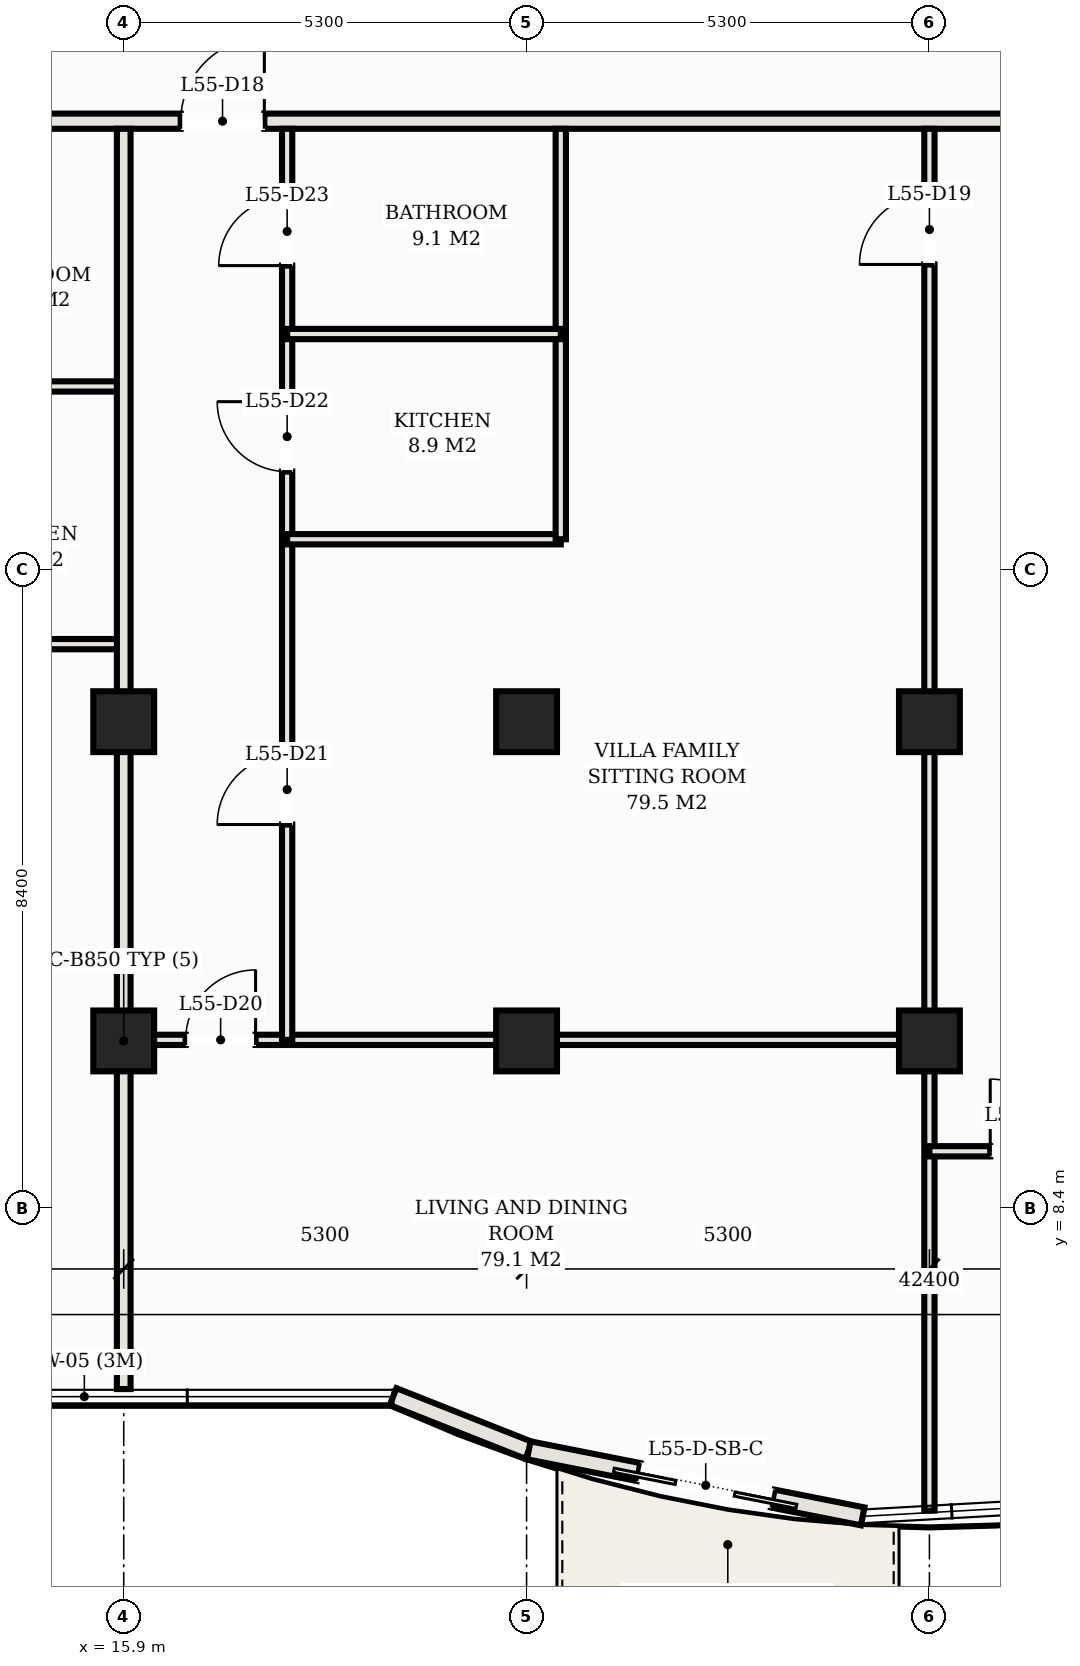
"""IFC4 building model, lengths in metres.
Left out: names, types, materials, properties, quantities, classifications, styles, units other than length and angle.
Written with IfcOpenShell. Run it as: python <this file> out.ifc"""

import sys

from ifc_helpers import new_model, si_unit, direction, frame, frame_2d, origin, origin_2d, place, context, subcontext, project, spatial, rectangle, hollow_rectangle, extrude, element, fill, save


model = new_model("IFC4")
c1 = context("Model", 3, precision=1e-05, world=origin(), true_north=direction((0.0, 1.0)))
c2 = subcontext(c1, "Body", "Model", "MODEL_VIEW")
j1 = project(units=[si_unit("LENGTHUNIT", "METRE"), si_unit("PLANEANGLEUNIT", "RADIAN")], contexts=[c1])
p1 = place(None, origin())
s1 = spatial("IfcSite", under=j1, at=p1, CompositionType="ELEMENT")
p2 = place(p1, origin())
s2 = spatial("IfcBuilding", under=s1, at=p2, CompositionType="ELEMENT")
p3 = place(p2, frame((0.0, 0.0, 203.3)))
s3 = spatial("IfcBuildingStorey", under=s2, at=p3, CompositionType="ELEMENT", Elevation=203.3)
for number, where, z_axis, x_axis in (
    (1, (15.9, 14.8, 0.0), (0.0, 0.0, 1.0), (1.0, 0.0, 0.0)),
    (2, (15.9, 10.6, 0.0), (0.0, 0.0, 1.0), (1.0, 0.0, 0.0)),
    (3, (21.2, 14.8, 0.0), (0.0, 0.0, 1.0), (1.0, 0.0, 0.0)),
    (4, (21.2, 10.6, 0.0), (0.0, 0.0, 1.0), (1.0, 0.0, 0.0)),
    (5, (26.5, 14.8, 0.0), (0.0, 0.0, 1.0), (1.0, 0.0, 0.0)),
    (6, (26.5, 10.6, 0.0), (0.0, 0.0, 1.0), (1.0, 0.0, 0.0)),
):
    element("IfcColumn", number, at=place(p3, frame(where, z_axis=z_axis, x_axis=x_axis)), inside=s3, PredefinedType="COLUMN", context=c2, shape_type="SweptSolid", body=[
        extrude(hollow_rectangle(XDim=0.8, YDim=0.8, WallThickness=0.028, at=origin_2d()), origin(), (0.0, 0.0, 1.0), 3.3),
    ])
p4 = place(p3, frame((19.444, 5.92, 0.0), z_axis=(0.0, 0.0, 1.0), x_axis=(0.92993442177, -0.367725401906, 0.0)))
e7 = element("IfcWall", 7, at=p4, inside=s3, PredefinedType="SOLIDWALL", context=c2, shape_type="SweptSolid", body=[
    extrude(rectangle(XDim=1.919, YDim=0.24, at=frame_2d((0.96, 0.0))), origin(), (0.0, 0.0, 1.0), 3.11),
])
p5 = place(p3, frame((21.229, 5.214, 0.0), z_axis=(0.0, 0.0, 1.0), x_axis=(0.980985349685, -0.194081796425, 0.0)))
e8 = element("IfcWall", 8, at=p5, inside=s3, PredefinedType="SOLIDWALL", context=c2, shape_type="SweptSolid", body=[
    extrude(rectangle(XDim=4.478, YDim=0.24, at=frame_2d((2.239, 0.0))), origin(), (0.0, 0.0, 1.0), 3.11),
])
p6 = place(p5, frame((1.473, 0.0, 0.0)))
e9 = element("IfcOpeningElement", 9, at=p6, cuts=e8, PredefinedType="OPENING", context=c2, shape_type="SweptSolid", body=[
    extrude(rectangle(XDim=1.8, YDim=2.2, at=frame_2d((0.9, 1.1))), frame((0.0, 0.13, 0.0), z_axis=(0.0, -1.0, 0.0), x_axis=(1.0, 0.0, 0.0)), (0.0, 0.0, 1.0), 0.26),
])
p7 = place(p3, frame((6.72, 22.7, 0.0), z_axis=(0.0, 0.0, 1.0), x_axis=(1.0, 0.0, 0.0)))
e10 = element("IfcWall", 10, at=p7, inside=s3, PredefinedType="PARTITIONING", context=c2, shape_type="SweptSolid", body=[
    extrude(rectangle(XDim=39.56, YDim=0.2, at=frame_2d((19.78, 0.0))), origin(), (0.0, 0.0, 1.0), 2.43),
])
p8 = place(p7, frame((4.63, 0.0, 0.0)))
e11 = element("IfcOpeningElement", 11, at=p8, cuts=e10, PredefinedType="OPENING", context=c2, shape_type="SweptSolid", body=[
    extrude(rectangle(XDim=1.1, YDim=2.25, at=frame_2d((0.55, 1.125))), frame((0.0, 0.11, 0.0), z_axis=(0.0, -1.0, 0.0), x_axis=(1.0, 0.0, 0.0)), (0.0, 0.0, 1.0), 0.22),
])
p9 = place(p7, frame((9.93, 0.0, 0.0)))
e12 = element("IfcOpeningElement", 12, at=p9, cuts=e10, PredefinedType="OPENING", context=c2, shape_type="SweptSolid", body=[
    extrude(rectangle(XDim=1.1, YDim=2.25, at=frame_2d((0.55, 1.125))), frame((0.0, 0.11, 0.0), z_axis=(0.0, -1.0, 0.0), x_axis=(1.0, 0.0, 0.0)), (0.0, 0.0, 1.0), 0.22),
])
p10 = place(p7, frame((25.83, 0.0, 0.0)))
e13 = element("IfcOpeningElement", 13, at=p10, cuts=e10, PredefinedType="OPENING", context=c2, shape_type="SweptSolid", body=[
    extrude(rectangle(XDim=1.1, YDim=2.25, at=frame_2d((0.55, 1.125))), frame((0.0, 0.11, 0.0), z_axis=(0.0, -1.0, 0.0), x_axis=(1.0, 0.0, 0.0)), (0.0, 0.0, 1.0), 0.22),
])
p11 = place(p7, frame((1.435, 0.0, 0.0)))
e14 = element("IfcOpeningElement", 14, at=p11, cuts=e10, PredefinedType="OPENING", context=c2, shape_type="SweptSolid", body=[
    extrude(rectangle(XDim=0.92, YDim=2.15, at=frame_2d((0.46, 1.075))), frame((0.0, 0.11, 0.0), z_axis=(0.0, -1.0, 0.0), x_axis=(1.0, 0.0, 0.0)), (0.0, 0.0, 1.0), 0.22),
])
p12 = place(p7, frame((37.205, 0.0, 0.0)))
e15 = element("IfcOpeningElement", 15, at=p12, cuts=e10, PredefinedType="OPENING", context=c2, shape_type="SweptSolid", body=[
    extrude(rectangle(XDim=0.92, YDim=2.15, at=frame_2d((0.46, 1.075))), frame((0.0, 0.11, 0.0), z_axis=(0.0, -1.0, 0.0), x_axis=(1.0, 0.0, 0.0)), (0.0, 0.0, 1.0), 0.22),
])
for number, where, z_axis, x_axis in (
    (16, (12.75, 15.82, 0.0), (0.0, 0.0, 1.0), (1.0, 0.0, 0.0)),
    (17, (12.75, 19.21, 0.0), (0.0, 0.0, 1.0), (1.0, 0.0, 0.0)),
):
    element("IfcWall", number, at=place(p3, frame(where, z_axis=z_axis, x_axis=x_axis)), inside=s3, PredefinedType="PARTITIONING", context=c2, shape_type="SweptSolid", body=[
        extrude(rectangle(XDim=3.15, YDim=0.135, at=frame_2d((1.575, 0.0))), origin(), (0.0, 0.0, 1.0), 2.43),
    ])
p13 = place(p3, frame((15.9, 6.02, 0.0), z_axis=(0.0, 0.0, 1.0), x_axis=(0.0, 1.0, 0.0)))
e18 = element("IfcWall", 18, at=p13, inside=s3, PredefinedType="PARTITIONING", context=c2, shape_type="SweptSolid", body=[
    extrude(rectangle(XDim=16.58, YDim=0.18, at=frame_2d((8.29, 0.0))), origin(), (0.0, 0.0, 1.0), 2.43),
])
p14 = place(p3, frame((26.5, 4.42, 0.0), z_axis=(0.0, 0.0, 1.0), x_axis=(0.0, 1.0, 0.0)))
e19 = element("IfcWall", 19, at=p14, inside=s3, PredefinedType="PARTITIONING", context=c2, shape_type="SweptSolid", body=[
    extrude(rectangle(XDim=18.18, YDim=0.135, at=frame_2d((9.09, 0.0))), origin(), (0.0, 0.0, 1.0), 2.43),
])
p15 = place(p14, frame((16.395, 0.0, 0.0)))
e20 = element("IfcOpeningElement", 20, at=p15, cuts=e19, PredefinedType="OPENING", context=c2, shape_type="SweptSolid", body=[
    extrude(rectangle(XDim=0.92, YDim=2.15, at=frame_2d((0.46, 1.075))), frame((0.0, 0.078, 0.0), z_axis=(0.0, -1.0, 0.0), x_axis=(1.0, 0.0, 0.0)), (0.0, 0.0, 1.0), 0.155),
])
p16 = place(p3, frame((15.9, 10.614, 0.0), z_axis=(0.0, 0.0, 1.0), x_axis=(1.0, 0.0, 0.0)))
e21 = element("IfcWall", 21, at=p16, inside=s3, PredefinedType="PARTITIONING", context=c2, shape_type="SweptSolid", body=[
    extrude(rectangle(XDim=10.6, YDim=0.135, at=frame_2d((5.3, 0.0))), origin(), (0.0, 0.0, 1.0), 2.43),
])
p17 = place(p16, frame((0.815, 0.0, 0.0)))
e22 = element("IfcOpeningElement", 22, at=p17, cuts=e21, PredefinedType="OPENING", context=c2, shape_type="SweptSolid", body=[
    extrude(rectangle(XDim=0.92, YDim=2.15, at=frame_2d((0.46, 1.075))), frame((0.0, 0.078, 0.0), z_axis=(0.0, -1.0, 0.0), x_axis=(1.0, 0.0, 0.0)), (0.0, 0.0, 1.0), 0.155),
])
p18 = place(p3, frame((18.05, 10.614, 0.0), z_axis=(0.0, 0.0, 1.0), x_axis=(0.0, 1.0, 0.0)))
e23 = element("IfcWall", 23, at=p18, inside=s3, PredefinedType="PARTITIONING", context=c2, shape_type="SweptSolid", body=[
    extrude(rectangle(XDim=11.986, YDim=0.135, at=frame_2d((5.993, 0.0))), origin(), (0.0, 0.0, 1.0), 2.43),
])
p19 = place(p18, frame((2.833, 0.0, 0.0)))
e24 = element("IfcOpeningElement", 24, at=p19, cuts=e23, PredefinedType="OPENING", context=c2, shape_type="SweptSolid", body=[
    extrude(rectangle(XDim=0.92, YDim=2.15, at=frame_2d((0.46, 1.075))), frame((0.0, 0.078, 0.0), z_axis=(0.0, -1.0, 0.0), x_axis=(1.0, 0.0, 0.0)), (0.0, 0.0, 1.0), 0.155),
])
p20 = place(p18, frame((7.476, 0.0, 0.0)))
e25 = element("IfcOpeningElement", 25, at=p20, cuts=e23, PredefinedType="OPENING", context=c2, shape_type="SweptSolid", body=[
    extrude(rectangle(XDim=0.92, YDim=2.15, at=frame_2d((0.46, 1.075))), frame((0.0, 0.078, 0.0), z_axis=(0.0, -1.0, 0.0), x_axis=(1.0, 0.0, 0.0)), (0.0, 0.0, 1.0), 0.155),
])
p21 = place(p18, frame((10.186, 0.0, 0.0)))
e26 = element("IfcOpeningElement", 26, at=p21, cuts=e23, PredefinedType="OPENING", context=c2, shape_type="SweptSolid", body=[
    extrude(rectangle(XDim=0.9, YDim=2.15, at=frame_2d((0.45, 1.075))), frame((0.0, 0.078, 0.0), z_axis=(0.0, -1.0, 0.0), x_axis=(1.0, 0.0, 0.0)), (0.0, 0.0, 1.0), 0.155),
])
p22 = place(p3, frame((18.05, 17.2, 0.0), z_axis=(0.0, 0.0, 1.0), x_axis=(1.0, 0.0, 0.0)))
e27 = element("IfcWall", 27, at=p22, inside=s3, PredefinedType="PARTITIONING", context=c2, shape_type="SweptSolid", body=[
    extrude(rectangle(XDim=3.6, YDim=0.135, at=frame_2d((1.8, 0.0))), origin(), (0.0, 0.0, 1.0), 2.43),
])
p23 = place(p3, frame((21.65, 17.2, 0.0), z_axis=(0.0, 0.0, 1.0), x_axis=(0.0, 1.0, 0.0)))
e28 = element("IfcWall", 28, at=p23, inside=s3, PredefinedType="PARTITIONING", context=c2, shape_type="SweptSolid", body=[
    extrude(rectangle(XDim=5.4, YDim=0.135, at=frame_2d((2.7, 0.0))), origin(), (0.0, 0.0, 1.0), 2.43),
])
p24 = place(p3, frame((18.05, 19.9, 0.0), z_axis=(0.0, 0.0, 1.0), x_axis=(1.0, 0.0, 0.0)))
e29 = element("IfcWall", 29, at=p24, inside=s3, PredefinedType="PARTITIONING", context=c2, shape_type="SweptSolid", body=[
    extrude(rectangle(XDim=3.6, YDim=0.135, at=frame_2d((1.8, 0.0))), origin(), (0.0, 0.0, 1.0), 2.43),
])
p25 = place(p3, frame((26.5, 9.148, 0.0), z_axis=(0.0, 0.0, 1.0), x_axis=(1.0, 0.0, 0.0)))
e30 = element("IfcWall", 30, at=p25, inside=s3, PredefinedType="PARTITIONING", context=c2, shape_type="SweptSolid", body=[
    extrude(rectangle(XDim=5.3, YDim=0.135, at=frame_2d((2.65, 0.0))), origin(), (0.0, 0.0, 1.0), 2.43),
])
p26 = place(p25, frame((0.8, 0.0, 0.0)))
e31 = element("IfcOpeningElement", 31, at=p26, cuts=e30, PredefinedType="OPENING", context=c2, shape_type="SweptSolid", body=[
    extrude(rectangle(XDim=0.95, YDim=2.15, at=frame_2d((0.475, 1.075))), frame((0.0, 0.078, 0.0), z_axis=(0.0, -1.0, 0.0), x_axis=(1.0, 0.0, 0.0)), (0.0, 0.0, 1.0), 0.155),
])
p27 = place(p25, frame((3.275, 0.0, 0.0)))
e32 = element("IfcOpeningElement", 32, at=p27, cuts=e30, PredefinedType="OPENING", context=c2, shape_type="SweptSolid", body=[
    extrude(rectangle(XDim=0.9, YDim=2.15, at=frame_2d((0.45, 1.075))), frame((0.0, 0.078, 0.0), z_axis=(0.0, -1.0, 0.0), x_axis=(1.0, 0.0, 0.0)), (0.0, 0.0, 1.0), 0.155),
])
p28 = place(p6, frame((1.8, 0.0, 0.0), z_axis=(0.0, 0.0, 1.0), x_axis=(-1.0, 0.0, 0.0)))
e33 = element("IfcDoor", 33, at=p28, inside=s3, OperationType="DOUBLE_DOOR_SLIDING", PredefinedType="DOOR", context=c2, shape_type="SweptSolid", body=[
    extrude(rectangle(XDim=1.8, YDim=2.2, at=frame_2d((0.9, 1.1))), frame((0.0, 0.025, 0.0), z_axis=(0.0, -1.0, 0.0), x_axis=(1.0, 0.0, 0.0)), (0.0, 0.0, 1.0), 0.05),
])
fill(e9, e33)
p29 = place(p9, origin())
e34 = element("IfcDoor", 34, at=p29, inside=s3, OperationType="SINGLE_SWING_RIGHT", PredefinedType="DOOR", context=c2, shape_type="SweptSolid", body=[
    extrude(rectangle(XDim=1.1, YDim=2.25, at=frame_2d((0.55, 1.125))), frame((0.0, 0.025, 0.0), z_axis=(0.0, -1.0, 0.0), x_axis=(1.0, 0.0, 0.0)), (0.0, 0.0, 1.0), 0.05),
])
fill(e12, e34)
p30 = place(p15, origin())
e35 = element("IfcDoor", 35, at=p30, inside=s3, OperationType="SINGLE_SWING_LEFT", PredefinedType="DOOR", context=c2, shape_type="SweptSolid", body=[
    extrude(rectangle(XDim=0.92, YDim=2.15, at=frame_2d((0.46, 1.075))), frame((0.0, 0.025, 0.0), z_axis=(0.0, -1.0, 0.0), x_axis=(1.0, 0.0, 0.0)), (0.0, 0.0, 1.0), 0.05),
])
fill(e20, e35)
p31 = place(p17, origin())
e36 = element("IfcDoor", 36, at=p31, inside=s3, OperationType="SINGLE_SWING_RIGHT", PredefinedType="DOOR", context=c2, shape_type="SweptSolid", body=[
    extrude(rectangle(XDim=0.92, YDim=2.15, at=frame_2d((0.46, 1.075))), frame((0.0, 0.025, 0.0), z_axis=(0.0, -1.0, 0.0), x_axis=(1.0, 0.0, 0.0)), (0.0, 0.0, 1.0), 0.05),
])
fill(e22, e36)
p32 = place(p19, origin())
e37 = element("IfcDoor", 37, at=p32, inside=s3, OperationType="SINGLE_SWING_LEFT", PredefinedType="DOOR", context=c2, shape_type="SweptSolid", body=[
    extrude(rectangle(XDim=0.92, YDim=2.15, at=frame_2d((0.46, 1.075))), frame((0.0, 0.025, 0.0), z_axis=(0.0, -1.0, 0.0), x_axis=(1.0, 0.0, 0.0)), (0.0, 0.0, 1.0), 0.05),
])
fill(e24, e37)
p33 = place(p20, origin())
e38 = element("IfcDoor", 38, at=p33, inside=s3, OperationType="SINGLE_SWING_RIGHT", PredefinedType="DOOR", context=c2, shape_type="SweptSolid", body=[
    extrude(rectangle(XDim=0.92, YDim=2.15, at=frame_2d((0.46, 1.075))), frame((0.0, 0.025, 0.0), z_axis=(0.0, -1.0, 0.0), x_axis=(1.0, 0.0, 0.0)), (0.0, 0.0, 1.0), 0.05),
])
fill(e25, e38)
p34 = place(p21, origin())
e39 = element("IfcDoor", 39, at=p34, inside=s3, OperationType="SINGLE_SWING_LEFT", PredefinedType="DOOR", context=c2, shape_type="SweptSolid", body=[
    extrude(rectangle(XDim=0.9, YDim=2.15, at=frame_2d((0.45, 1.075))), frame((0.0, 0.025, 0.0), z_axis=(0.0, -1.0, 0.0), x_axis=(1.0, 0.0, 0.0)), (0.0, 0.0, 1.0), 0.05),
])
fill(e26, e39)
p35 = place(p26, origin())
e40 = element("IfcDoor", 40, at=p35, inside=s3, OperationType="SINGLE_SWING_LEFT", PredefinedType="DOOR", context=c2, shape_type="SweptSolid", body=[
    extrude(rectangle(XDim=0.95, YDim=2.15, at=frame_2d((0.475, 1.075))), frame((0.0, 0.025, 0.0), z_axis=(0.0, -1.0, 0.0), x_axis=(1.0, 0.0, 0.0)), (0.0, 0.0, 1.0), 0.05),
])
fill(e31, e40)
save(model, sys.argv[1])
